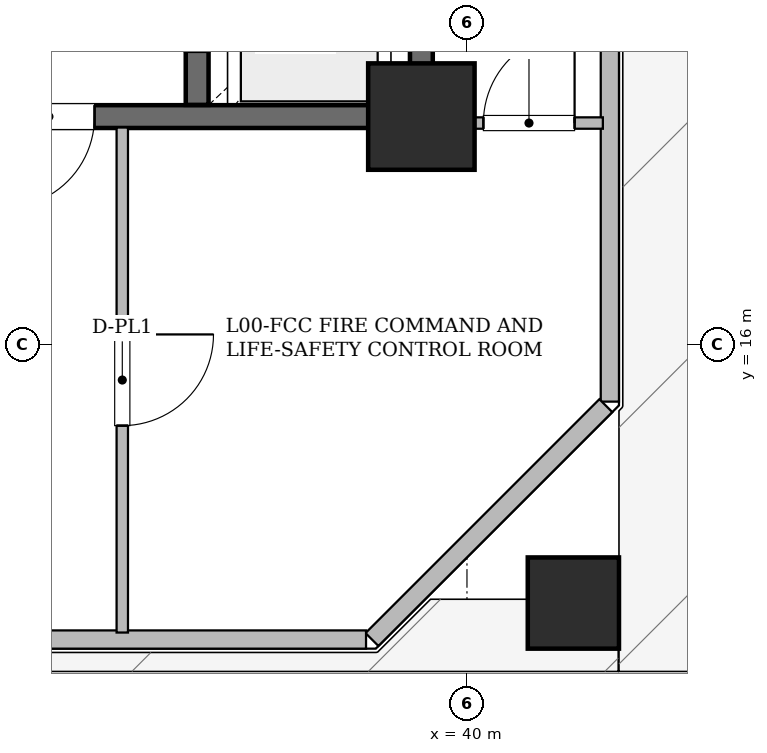
"""IFC4 building model, lengths in metres.
Left out: names, types, materials, properties, quantities, classifications, styles, units other than length and angle.
Written with IfcOpenShell. Run it as: python <this file> out.ifc"""

import sys

from ifc_helpers import new_model, si_unit, direction, frame, frame_2d, origin, origin_2d, place, context, subcontext, project, spatial, rectangle, hollow_rectangle, extrude, element, fill, save


model = new_model("IFC4")
c1 = context("Model", 3, precision=1e-05, world=origin(), true_north=direction((0.0, 1.0)))
c2 = subcontext(c1, "Body", "Model", "MODEL_VIEW")
j1 = project(units=[si_unit("LENGTHUNIT", "METRE"), si_unit("PLANEANGLEUNIT", "RADIAN")], contexts=[c1])
p1 = place(None, origin())
s1 = spatial("IfcSite", under=j1, at=p1, CompositionType="ELEMENT")
p2 = place(p1, origin())
s2 = spatial("IfcBuilding", under=s1, at=p2, CompositionType="ELEMENT")
p3 = place(p2, origin())
s3 = spatial("IfcBuildingStorey", under=s2, at=p3, CompositionType="ELEMENT", Elevation=0.0)
p4 = place(p3, frame((39.4, 19.0, 0.0), z_axis=(0.0, 0.0, 1.0), x_axis=(1.0, 0.0, 0.0)))
e1 = element("IfcColumn", 1, at=p4, inside=s3, PredefinedType="COLUMN", context=c2, shape_type="SweptSolid", body=[
    extrude(hollow_rectangle(XDim=1.4, YDim=1.4, WallThickness=0.07, at=origin_2d()), origin(), (0.0, 0.0, 1.0), 7.2),
])
p5 = place(p3, frame((41.4, 12.6, 0.0), z_axis=(0.0, 0.0, 1.0), x_axis=(1.0, 0.0, 0.0)))
e2 = element("IfcColumn", 2, at=p5, inside=s3, PredefinedType="COLUMN", context=c2, shape_type="SweptSolid", body=[
    extrude(hollow_rectangle(XDim=1.2, YDim=1.2, WallThickness=0.06, at=origin_2d()), origin(), (0.0, 0.0, 1.0), 7.2),
])
p6 = place(p3, frame((41.88, 25.506, 0.0), z_axis=(0.0, 0.0, 1.0), x_axis=(0.0, -1.0, 0.0)))
e3 = element("IfcWall", 3, at=p6, inside=s3, PredefinedType="STANDARD", context=c2, shape_type="SweptSolid", body=[
    extrude(rectangle(XDim=10.256, YDim=0.24, at=frame_2d((5.128, 0.0))), origin(), (0.0, 0.0, 1.0), 6.78),
])
p7 = place(p3, frame((41.827, 15.197, 0.0), z_axis=(0.0, 0.0, 1.0), x_axis=(-0.707106781187, -0.707106781187, 0.0)))
e4 = element("IfcWall", 4, at=p7, inside=s3, PredefinedType="STANDARD", context=c2, shape_type="SweptSolid", body=[
    extrude(rectangle(XDim=4.351, YDim=0.24, at=frame_2d((2.176, 0.0))), origin(), (0.0, 0.0, 1.0), 6.78),
])
p8 = place(p3, frame((38.672, 12.12, 0.0), z_axis=(0.0, 0.0, 1.0), x_axis=(-1.0, 0.0, 0.0)))
e5 = element("IfcWall", 5, at=p8, inside=s3, PredefinedType="STANDARD", context=c2, shape_type="SweptSolid", body=[
    extrude(rectangle(XDim=19.575, YDim=0.24, at=frame_2d((9.788, 0.0))), origin(), (0.0, 0.0, 1.0), 6.78),
])
p9 = place(p8, frame((6.2, 0.0, 0.0)))
e6 = element("IfcOpeningElement", 6, at=p9, cuts=e5, PredefinedType="OPENING", context=c2, shape_type="SweptSolid", body=[
    extrude(rectangle(XDim=1.8, YDim=2.2, at=frame_2d((0.9, 1.1))), frame((0.0, 0.13, 0.0), z_axis=(0.0, -1.0, 0.0), x_axis=(1.0, 0.0, 0.0)), (0.0, 0.0, 1.0), 0.26),
])
p10 = place(p8, frame((15.975, 0.0, 0.0)))
e7 = element("IfcOpeningElement", 7, at=p10, cuts=e5, PredefinedType="OPENING", context=c2, shape_type="SweptSolid", body=[
    extrude(rectangle(XDim=1.8, YDim=2.2, at=frame_2d((0.9, 1.1))), frame((0.0, 0.13, 0.0), z_axis=(0.0, -1.0, 0.0), x_axis=(1.0, 0.0, 0.0)), (0.0, 0.0, 1.0), 0.26),
])
p11 = place(p3, frame((39.4, 19.0, 0.0), z_axis=(0.0, 0.0, 1.0), x_axis=(-1.0, 0.0, 0.0)))
e8 = element("IfcWall", 8, at=p11, inside=s3, PredefinedType="SHEAR", context=c2, shape_type="SweptSolid", body=[
    extrude(rectangle(XDim=10.4, YDim=0.3, at=frame_2d((5.2, 0.0))), origin(), (0.0, 0.0, 1.0), 6.78),
])
p12 = place(p11, frame((4.3, 0.0, 0.0)))
e9 = element("IfcOpeningElement", 9, at=p12, cuts=e8, PredefinedType="OPENING", context=c2, shape_type="SweptSolid", body=[
    extrude(rectangle(XDim=1.2, YDim=2.15, at=frame_2d((0.6, 1.075))), frame((0.0, 0.16, 0.0), z_axis=(0.0, -1.0, 0.0), x_axis=(1.0, 0.0, 0.0)), (0.0, 0.0, 1.0), 0.32),
])
p13 = place(p3, frame((39.4, 19.0, 0.0), z_axis=(0.0, 0.0, 1.0), x_axis=(0.0, 1.0, 0.0)))
e10 = element("IfcWall", 10, at=p13, inside=s3, PredefinedType="SHEAR", context=c2, shape_type="SweptSolid", body=[
    extrude(rectangle(XDim=5.4, YDim=0.3, at=frame_2d((2.7, 0.0))), origin(), (0.0, 0.0, 1.0), 6.78),
])
p14 = place(p3, frame((36.45, 19.154, 0.0), z_axis=(0.0, 0.0, 1.0), x_axis=(0.0, 1.0, 0.0)))
e11 = element("IfcWall", 11, at=p14, inside=s3, PredefinedType="SHEAR", context=c2, shape_type="SweptSolid", body=[
    extrude(rectangle(XDim=4.546, YDim=0.3, at=frame_2d((2.273, 0.0))), origin(), (0.0, 0.0, 1.0), 6.78),
])
p15 = place(p14, frame((0.696, 0.0, 0.0)))
e12 = element("IfcOpeningElement", 12, at=p15, cuts=e11, PredefinedType="OPENING", context=c2, shape_type="SweptSolid", body=[
    extrude(rectangle(XDim=1.1, YDim=2.15, at=frame_2d((0.55, 1.075))), frame((0.0, 0.16, 0.0), z_axis=(0.0, -1.0, 0.0), x_axis=(1.0, 0.0, 0.0)), (0.0, 0.0, 1.0), 0.32),
])
p16 = place(p14, frame((3.316, 0.0, 0.0)))
e13 = element("IfcOpeningElement", 13, at=p16, cuts=e11, PredefinedType="OPENING", context=c2, shape_type="SweptSolid", body=[
    extrude(rectangle(XDim=1.1, YDim=2.15, at=frame_2d((0.55, 1.075))), frame((0.0, 0.16, 0.0), z_axis=(0.0, -1.0, 0.0), x_axis=(1.0, 0.0, 0.0)), (0.0, 0.0, 1.0), 0.32),
])
p17 = place(p3, frame((35.465, 18.856, 0.0), z_axis=(0.0, 0.0, 1.0), x_axis=(0.0, -1.0, 0.0)))
e14 = element("IfcWall", 14, at=p17, inside=s3, PredefinedType="STANDARD", context=c2, shape_type="SweptSolid", body=[
    extrude(rectangle(XDim=6.644, YDim=0.15, at=frame_2d((3.322, 0.0))), origin(), (0.0, 0.0, 1.0), 5.915),
])
p18 = place(p17, frame((2.722, 0.0, 0.0)))
e15 = element("IfcOpeningElement", 15, at=p18, cuts=e14, PredefinedType="OPENING", context=c2, shape_type="SweptSolid", body=[
    extrude(rectangle(XDim=1.2, YDim=2.15, at=frame_2d((0.6, 1.075))), frame((0.0, 0.085, 0.0), z_axis=(0.0, -1.0, 0.0), x_axis=(1.0, 0.0, 0.0)), (0.0, 0.0, 1.0), 0.17),
])
p19 = place(p3, frame((39.457, 18.915, 0.0), z_axis=(0.0, 0.0, 1.0), x_axis=(1.0, 0.0, 0.0)))
e16 = element("IfcWall", 16, at=p19, inside=s3, PredefinedType="STANDARD", context=c2, shape_type="SweptSolid", body=[
    extrude(rectangle(XDim=2.331, YDim=0.15, at=frame_2d((1.166, 0.0))), origin(), (0.0, 0.0, 1.0), 5.915),
])
p20 = place(p19, frame((0.759, 0.0, 0.0)))
e17 = element("IfcOpeningElement", 17, at=p20, cuts=e16, PredefinedType="OPENING", context=c2, shape_type="SweptSolid", body=[
    extrude(rectangle(XDim=1.2, YDim=2.15, at=frame_2d((0.6, 1.075))), frame((0.0, 0.085, 0.0), z_axis=(0.0, -1.0, 0.0), x_axis=(1.0, 0.0, 0.0)), (0.0, 0.0, 1.0), 0.17),
])
p21 = place(p12, origin())
e18 = element("IfcDoor", 18, at=p21, inside=s3, OperationType="SINGLE_SWING_RIGHT", PredefinedType="DOOR", context=c2, shape_type="SweptSolid", body=[
    extrude(rectangle(XDim=1.2, YDim=2.15, at=frame_2d((0.6, 1.075))), frame((0.0, 0.025, 0.0), z_axis=(0.0, -1.0, 0.0), x_axis=(1.0, 0.0, 0.0)), (0.0, 0.0, 1.0), 0.05),
])
fill(e9, e18)
p22 = place(p18, origin())
e19 = element("IfcDoor", 19, at=p22, inside=s3, OperationType="SINGLE_SWING_LEFT", PredefinedType="DOOR", context=c2, shape_type="SweptSolid", body=[
    extrude(rectangle(XDim=1.2, YDim=2.15, at=frame_2d((0.6, 1.075))), frame((0.0, 0.025, 0.0), z_axis=(0.0, -1.0, 0.0), x_axis=(1.0, 0.0, 0.0)), (0.0, 0.0, 1.0), 0.05),
])
fill(e15, e19)
p23 = place(p20, origin())
e20 = element("IfcDoor", 20, at=p23, inside=s3, OperationType="SINGLE_SWING_RIGHT", PredefinedType="DOOR", context=c2, shape_type="SweptSolid", body=[
    extrude(rectangle(XDim=1.2, YDim=2.15, at=frame_2d((0.6, 1.075))), frame((0.0, 0.025, 0.0), z_axis=(0.0, -1.0, 0.0), x_axis=(1.0, 0.0, 0.0)), (0.0, 0.0, 1.0), 0.05),
])
fill(e17, e20)
save(model, sys.argv[1])
